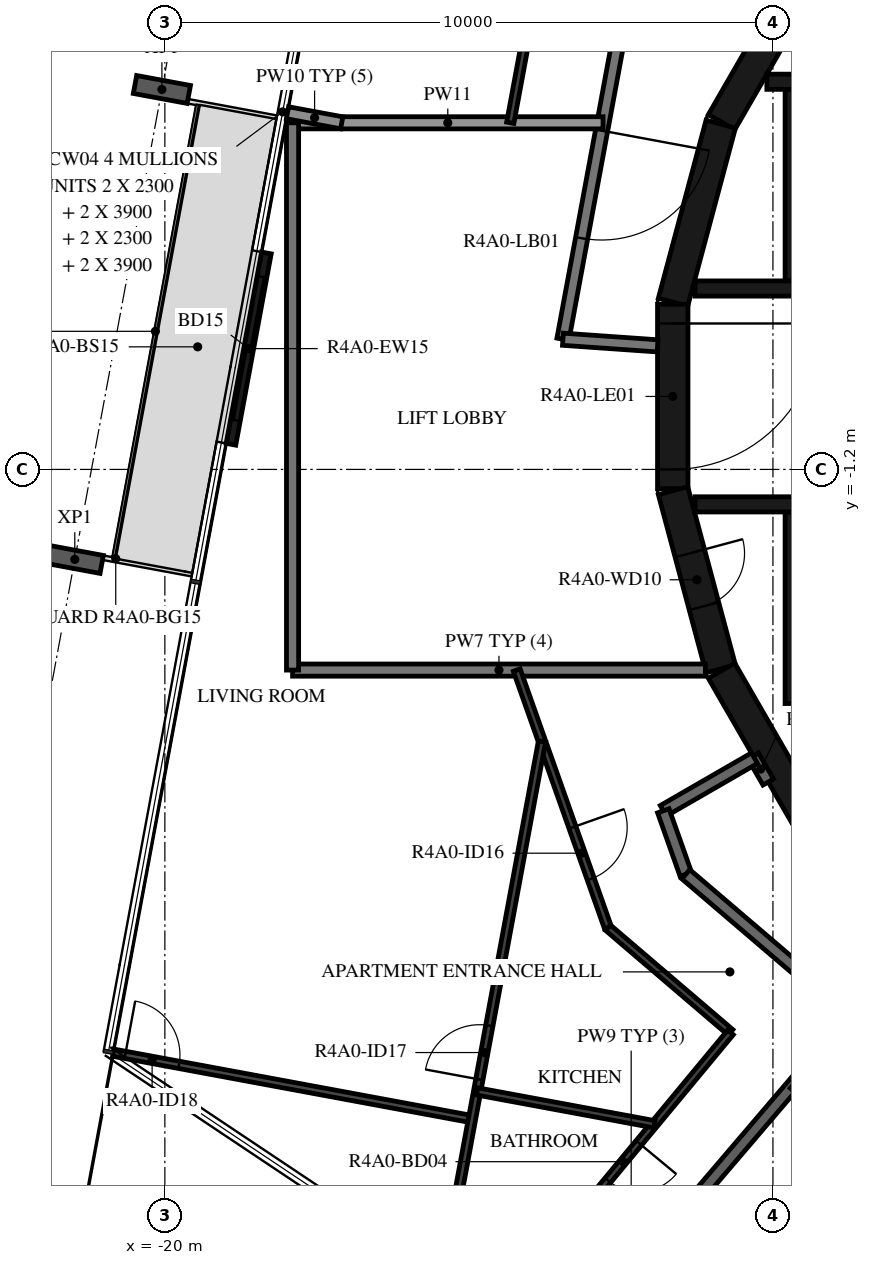
"""IFC4 building model, lengths in metres.
Left out: names, types, materials, properties, quantities, classifications, styles, units other than length and angle.
Written with IfcOpenShell. Run it as: python <this file> out.ifc"""

import sys

from ifc_helpers import new_model, si_unit, direction, frame, frame_2d, origin, origin_2d, place, context, subcontext, project, spatial, polyline, rectangle, i_section, outline, extrude, element, fill, save


model = new_model("IFC4")
c1 = context("Model", 3, precision=1e-05, world=origin(), true_north=direction((0.0, 1.0)))
c2 = subcontext(c1, "Body", "Model", "MODEL_VIEW")
j1 = project(units=[si_unit("LENGTHUNIT", "METRE"), si_unit("PLANEANGLEUNIT", "RADIAN")], contexts=[c1])
p1 = place(None, origin())
s1 = spatial("IfcSite", under=j1, at=p1, CompositionType="ELEMENT")
p2 = place(p1, origin())
s2 = spatial("IfcBuilding", under=s1, at=p2, CompositionType="ELEMENT")
p3 = place(p2, frame((0.0, 0.0, 158.7)))
s3 = spatial("IfcBuildingStorey", under=s2, at=p3, CompositionType="ELEMENT", Elevation=158.7)
for number, where, z_axis, x_axis in (
    (1, (-20.049, 5.048, -0.38), (0.0, 0.0, 1.0), (0.182, 0.983, 0.0)),
    (2, (-21.481, -2.68, -0.38), (0.0, 0.0, 1.0), (0.182, 0.983, 0.0)),
):
    element("IfcColumn", number, at=place(p3, frame(where, z_axis=z_axis, x_axis=x_axis)), inside=s3, PredefinedType="COLUMN", context=c2, shape_type="SweptSolid", body=[
        extrude(i_section(OverallWidth=0.3, OverallDepth=0.9, WebThickness=0.019, FlangeThickness=0.035, FilletRadius=0.03, at=origin_2d()), origin(), (0.0, 0.0, 1.0), 3.5),
    ])
p4 = place(p3, frame((-18.33, 2.36, 0.0), z_axis=(0.0, 0.0, 1.0), x_axis=(-0.18226136951, -0.983250117307, 0.0)))
e3 = element("IfcWall", 3, at=p4, inside=s3, PredefinedType="STANDARD", context=c2, shape_type="SweptSolid", body=[
    extrude(rectangle(XDim=3.2, YDim=0.16, at=frame_2d((1.6, 0.0))), origin(), (0.0, 0.0, 1.0), 3.12),
])
p5 = place(p4, frame((0.4, 0.0, 0.0)))
e4 = element("IfcOpeningElement", 4, at=p5, cuts=e3, PredefinedType="OPENING", context=c2, shape_type="SweptSolid", body=[
    extrude(rectangle(XDim=2.4, YDim=2.4, at=frame_2d((1.2, 1.2))), frame((0.0, 0.09, 0.0), z_axis=(0.0, -1.0, 0.0), x_axis=(1.0, 0.0, 0.0)), (0.0, 0.0, 1.0), 0.18),
])
for number, where, z_axis, x_axis in (
    (5, (-9.329, 7.137, 0.0), (0.0, 0.0, 1.0), (-0.5, -0.866, 0.0)),
    (6, (-10.858, 4.479, 0.0), (0.0, 0.0, 1.0), (-0.259, -0.966, 0.0)),
):
    element("IfcWall", number, at=place(p3, frame(where, z_axis=z_axis, x_axis=x_axis)), inside=s3, PredefinedType="SHEAR", context=c2, shape_type="SweptSolid", body=[
        extrude(rectangle(XDim=3.033, YDim=0.5, at=frame_2d((1.516, 0.0))), origin(), (0.0, 0.0, 1.0), 3.12),
    ])
p6 = place(p3, frame((-11.647, 1.516, 0.0), z_axis=(0.0, 0.0, 1.0), x_axis=(0.0, -1.0, 0.0)))
e7 = element("IfcWall", 7, at=p6, inside=s3, PredefinedType="SHEAR", context=c2, shape_type="SweptSolid", body=[
    extrude(rectangle(XDim=3.033, YDim=0.5, at=frame_2d((1.516, 0.0))), origin(), (0.0, 0.0, 1.0), 3.12),
])
p7 = place(p6, frame((0.316, 0.0, 0.0)))
e8 = element("IfcOpeningElement", 8, at=p7, cuts=e7, PredefinedType="OPENING", context=c2, shape_type="SweptSolid", body=[
    extrude(rectangle(XDim=2.4, YDim=2.1, at=frame_2d((1.2, 1.05))), frame((0.0, 0.26, 0.0), z_axis=(0.0, -1.0, 0.0), x_axis=(1.0, 0.0, 0.0)), (0.0, 0.0, 1.0), 0.52),
])
p8 = place(p3, frame((-11.643, -1.55, 0.0), z_axis=(0.0, 0.0, 1.0), x_axis=(0.258734743916, -0.965948410781, 0.0)))
e9 = element("IfcWall", 9, at=p8, inside=s3, PredefinedType="SHEAR", context=c2, shape_type="SweptSolid", body=[
    extrude(rectangle(XDim=3.033, YDim=0.5, at=frame_2d((1.516, 0.0))), origin(), (0.0, 0.0, 1.0), 3.12),
])
p9 = place(p8, frame((1.066, 0.0, 0.0)))
e10 = element("IfcOpeningElement", 10, at=p9, cuts=e9, PredefinedType="OPENING", context=c2, shape_type="SweptSolid", body=[
    extrude(rectangle(XDim=0.9, YDim=2.1, at=frame_2d((0.45, 1.05))), frame((0.0, 0.26, 0.0), z_axis=(0.0, -1.0, 0.0), x_axis=(1.0, 0.0, 0.0)), (0.0, 0.0, 1.0), 0.52),
])
p10 = place(p3, frame((-10.845, -4.51, 0.0), z_axis=(0.0, 0.0, 1.0), x_axis=(0.500087131594, -0.865975092491, 0.0)))
e11 = element("IfcWall", 11, at=p10, inside=s3, PredefinedType="SHEAR", context=c2, shape_type="SweptSolid", body=[
    extrude(rectangle(XDim=3.033, YDim=0.5, at=frame_2d((1.516, 0.0))), origin(), (0.0, 0.0, 1.0), 3.12),
])
p11 = place(p3, frame((-7.0, 5.175, 0.0), z_axis=(0.0, 0.0, 1.0), x_axis=(-1.0, 0.0, 0.0)))
e12 = element("IfcWall", 12, at=p11, inside=s3, PredefinedType="SHEAR", context=c2, shape_type="SweptSolid", body=[
    extrude(rectangle(XDim=3.1, YDim=0.25, at=frame_2d((1.55, 0.0))), origin(), (0.0, 0.0, 1.0), 3.12),
])
p12 = place(p3, origin())
e13 = element("IfcWall", 13, at=p12, inside=s3, PredefinedType="SHEAR", context=c2, shape_type="SweptSolid", body=[
    extrude(outline(polyline([(-9.55, 4.8), (-1.2, 4.8), (-1.2, 1.9), (-0.95, 1.9), (-0.95, 4.8), (0.95, 4.8), (0.95, 1.9), (1.2, 1.9), (1.2, 4.8), (3.1, 4.8), (3.1, 1.9), (3.35, 1.9), (3.35, 4.8), (5.25, 4.8), (5.25, 1.9), (5.5, 1.9), (5.5, 4.8), (7.4, 4.8), (7.4, 1.9), (7.65, 1.9), (7.65, 4.8), (9.55, 4.8), (9.55, 1.9), (9.8, 1.9), (9.8, 4.8), (9.8, 5.05), (-9.8, 5.05), (-9.8, 4.8), (-9.8, 1.9), (-9.55, 1.9), (-9.55, 4.8)])), origin(), (0.0, 0.0, 1.0), 3.12),
])
p13 = place(p3, origin())
e14 = element("IfcWall", 14, at=p13, inside=s3, PredefinedType="SHEAR", context=c2, shape_type="SweptSolid", body=[
    extrude(outline(polyline([(9.8, -5.05), (9.8, -4.8), (9.8, -1.9), (9.55, -1.9), (9.55, -4.8), (7.65, -4.8), (7.65, -1.9), (7.4, -1.9), (7.4, -4.8), (5.5, -4.8), (5.5, -1.9), (5.25, -1.9), (5.25, -4.8), (3.35, -4.8), (3.35, -1.9), (3.1, -1.9), (3.1, -4.8), (1.2, -4.8), (1.2, -1.9), (0.95, -1.9), (0.95, -4.8), (-0.95, -4.8), (-0.95, -1.9), (-1.2, -1.9), (-1.2, -4.8), (-3.1, -4.8), (-3.1, -1.9), (-3.35, -1.9), (-3.35, -4.8), (-5.25, -4.8), (-5.25, -1.9), (-5.5, -1.9), (-5.5, -4.8), (-7.4, -4.8), (-7.4, -1.9), (-7.65, -1.9), (-7.65, -4.8), (-9.55, -4.8), (-9.55, -1.9), (-9.8, -1.9), (-9.8, -4.8), (-9.8, -5.05), (9.8, -5.05)])), origin(), (0.0, 0.0, 1.0), 3.12),
])
p14 = place(p3, frame((-11.28, 1.775, 0.0), z_axis=(0.0, 0.0, 1.0), x_axis=(1.0, 0.0, 0.0)))
e15 = element("IfcWall", 15, at=p14, inside=s3, PredefinedType="SHEAR", context=c2, shape_type="SweptSolid", body=[
    extrude(rectangle(XDim=14.38, YDim=0.25, at=frame_2d((7.19, 0.0))), origin(), (0.0, 0.0, 1.0), 3.12),
])
p15 = place(p14, frame((10.73, 0.0, 0.0)))
e16 = element("IfcOpeningElement", 16, at=p15, cuts=e15, PredefinedType="OPENING", context=c2, shape_type="SweptSolid", body=[
    extrude(rectangle(XDim=1.1, YDim=2.1, at=frame_2d((0.55, 1.05))), frame((0.0, 0.135, 0.0), z_axis=(0.0, -1.0, 0.0), x_axis=(1.0, 0.0, 0.0)), (0.0, 0.0, 1.0), 0.27),
])
p16 = place(p14, frame((12.88, 0.0, 0.0)))
e17 = element("IfcOpeningElement", 17, at=p16, cuts=e15, PredefinedType="OPENING", context=c2, shape_type="SweptSolid", body=[
    extrude(rectangle(XDim=1.1, YDim=2.1, at=frame_2d((0.55, 1.05))), frame((0.0, 0.135, 0.0), z_axis=(0.0, -1.0, 0.0), x_axis=(1.0, 0.0, 0.0)), (0.0, 0.0, 1.0), 0.27),
])
p17 = place(p14, frame((5.455, 0.0, 0.0)))
e18 = element("IfcOpeningElement", 18, at=p17, cuts=e15, PredefinedType="OPENING", context=c2, shape_type="SweptSolid", body=[
    extrude(rectangle(XDim=0.9, YDim=2.1, at=frame_2d((0.45, 1.05))), frame((0.0, 0.135, 0.0), z_axis=(0.0, -1.0, 0.0), x_axis=(1.0, 0.0, 0.0)), (0.0, 0.0, 1.0), 0.27),
])
p18 = place(p3, frame((-11.28, -1.775, 0.0), z_axis=(0.0, 0.0, 1.0), x_axis=(1.0, 0.0, 0.0)))
e19 = element("IfcWall", 19, at=p18, inside=s3, PredefinedType="SHEAR", context=c2, shape_type="SweptSolid", body=[
    extrude(rectangle(XDim=14.38, YDim=0.25, at=frame_2d((7.19, 0.0))), origin(), (0.0, 0.0, 1.0), 3.12),
])
p19 = place(p18, frame((2.03, 0.0, 0.0)))
e20 = element("IfcOpeningElement", 20, at=p19, cuts=e19, PredefinedType="OPENING", context=c2, shape_type="SweptSolid", body=[
    extrude(rectangle(XDim=1.3, YDim=2.1, at=frame_2d((0.65, 1.05))), frame((0.0, 0.135, 0.0), z_axis=(0.0, -1.0, 0.0), x_axis=(1.0, 0.0, 0.0)), (0.0, 0.0, 1.0), 0.27),
])
p20 = place(p18, frame((4.18, 0.0, 0.0)))
e21 = element("IfcOpeningElement", 21, at=p20, cuts=e19, PredefinedType="OPENING", context=c2, shape_type="SweptSolid", body=[
    extrude(rectangle(XDim=1.3, YDim=2.1, at=frame_2d((0.65, 1.05))), frame((0.0, 0.135, 0.0), z_axis=(0.0, -1.0, 0.0), x_axis=(1.0, 0.0, 0.0)), (0.0, 0.0, 1.0), 0.27),
])
p21 = place(p18, frame((12.88, 0.0, 0.0)))
e22 = element("IfcOpeningElement", 22, at=p21, cuts=e19, PredefinedType="OPENING", context=c2, shape_type="SweptSolid", body=[
    extrude(rectangle(XDim=1.1, YDim=2.1, at=frame_2d((0.55, 1.05))), frame((0.0, 0.135, 0.0), z_axis=(0.0, -1.0, 0.0), x_axis=(1.0, 0.0, 0.0)), (0.0, 0.0, 1.0), 0.27),
])
p22 = place(p18, frame((6.53, 0.0, 0.0)))
e23 = element("IfcOpeningElement", 23, at=p22, cuts=e19, PredefinedType="OPENING", context=c2, shape_type="SweptSolid", body=[
    extrude(rectangle(XDim=0.9, YDim=2.1, at=frame_2d((0.45, 1.05))), frame((0.0, 0.135, 0.0), z_axis=(0.0, -1.0, 0.0), x_axis=(1.0, 0.0, 0.0)), (0.0, 0.0, 1.0), 0.27),
])
p23 = place(p18, frame((8.68, 0.0, 0.0)))
e24 = element("IfcOpeningElement", 24, at=p23, cuts=e19, PredefinedType="OPENING", context=c2, shape_type="SweptSolid", body=[
    extrude(rectangle(XDim=0.9, YDim=2.1, at=frame_2d((0.45, 1.05))), frame((0.0, 0.135, 0.0), z_axis=(0.0, -1.0, 0.0), x_axis=(1.0, 0.0, 0.0)), (0.0, 0.0, 1.0), 0.27),
])
p24 = place(p18, frame((10.83, 0.0, 0.0)))
e25 = element("IfcOpeningElement", 25, at=p24, cuts=e19, PredefinedType="OPENING", context=c2, shape_type="SweptSolid", body=[
    extrude(rectangle(XDim=0.9, YDim=2.1, at=frame_2d((0.45, 1.05))), frame((0.0, 0.135, 0.0), z_axis=(0.0, -1.0, 0.0), x_axis=(1.0, 0.0, 0.0)), (0.0, 0.0, 1.0), 0.27),
])
p25 = place(p3, frame((-12.521, 5.972, 0.0), z_axis=(0.0, 0.0, 1.0), x_axis=(-0.182251559718, -0.983251935661, 0.0)))
e26 = element("IfcWall", 26, at=p25, inside=s3, PredefinedType="STANDARD", context=c2, shape_type="SweptSolid", body=[
    extrude(rectangle(XDim=5.117, YDim=0.2, at=frame_2d((2.559, 0.0))), origin(), (0.0, 0.0, 1.0), 3.12),
])
p26 = place(p25, frame((1.627, 0.0, 0.0)))
e27 = element("IfcOpeningElement", 27, at=p26, cuts=e26, PredefinedType="OPENING", context=c2, shape_type="SweptSolid", body=[
    extrude(rectangle(XDim=1.8, YDim=2.1, at=frame_2d((0.9, 1.05))), frame((0.0, 0.11, 0.0), z_axis=(0.0, -1.0, 0.0), x_axis=(1.0, 0.0, 0.0)), (0.0, 0.0, 1.0), 0.22),
])
p27 = place(p3, frame((-13.454, 0.941, 0.0), z_axis=(0.0, 0.0, 1.0), x_axis=(0.99755155062, -0.069934997354, 0.0)))
e28 = element("IfcWall", 28, at=p27, inside=s3, PredefinedType="STANDARD", context=c2, shape_type="SweptSolid", body=[
    extrude(rectangle(XDim=1.561, YDim=0.2, at=frame_2d((0.78, 0.0))), origin(), (0.0, 0.0, 1.0), 3.12),
])
p28 = place(p3, frame((-10.323, -5.914, 0.0), z_axis=(0.0, 0.0, 1.0), x_axis=(0.500137201729, -0.865946175837, 0.0)))
e29 = element("IfcWall", 29, at=p28, inside=s3, PredefinedType="STANDARD", context=c2, shape_type="SweptSolid", body=[
    extrude(rectangle(XDim=0.492, YDim=0.2, at=frame_2d((0.246, 0.0))), origin(), (0.0, 0.0, 1.0), 3.12),
])
p29 = place(p3, frame((-10.303, -5.949, 0.0), z_axis=(0.0, 0.0, 1.0), x_axis=(-0.866021168401, -0.500007335828, 0.0)))
e30 = element("IfcWall", 30, at=p29, inside=s3, PredefinedType="STANDARD", context=c2, shape_type="SweptSolid", body=[
    extrude(rectangle(XDim=1.731, YDim=0.2, at=frame_2d((0.865, 0.0))), origin(), (0.0, 0.0, 1.0), 3.12),
])
p30 = place(p3, frame((-11.802, -6.814, 0.0), z_axis=(0.0, 0.0, 1.0), x_axis=(0.333904297771, -0.942606980629, 0.0)))
e31 = element("IfcWall", 31, at=p30, inside=s3, PredefinedType="STANDARD", context=c2, shape_type="SweptSolid", body=[
    extrude(rectangle(XDim=1.107, YDim=0.2, at=frame_2d((0.553, 0.0))), origin(), (0.0, 0.0, 1.0), 3.12),
])
p31 = place(p3, frame((-11.433, -7.858, 0.0), z_axis=(0.0, 0.0, 1.0), x_axis=(0.760412154545, -0.649440801937, 0.0)))
e32 = element("IfcWall", 32, at=p31, inside=s3, PredefinedType="STANDARD", context=c2, shape_type="SweptSolid", body=[
    extrude(rectangle(XDim=7.181, YDim=0.2, at=frame_2d((3.59, 0.0))), origin(), (0.0, 0.0, 1.0), 3.12),
])
p32 = place(p31, frame((2.39, 0.0, 0.0)))
e33 = element("IfcOpeningElement", 33, at=p32, cuts=e32, PredefinedType="OPENING", context=c2, shape_type="SweptSolid", body=[
    extrude(rectangle(XDim=1.0, YDim=2.1, at=frame_2d((0.5, 1.05))), frame((0.0, 0.11, 0.0), z_axis=(0.0, -1.0, 0.0), x_axis=(1.0, 0.0, 0.0)), (0.0, 0.0, 1.0), 0.22),
])
p33 = place(p3, frame((-12.794, 4.5, 0.0), z_axis=(0.0, 0.0, 1.0), x_axis=(-1.0, 0.0, 0.0)))
e34 = element("IfcWall", 34, at=p33, inside=s3, PredefinedType="STANDARD", context=c2, shape_type="SweptSolid", body=[
    extrude(rectangle(XDim=5.106, YDim=0.2, at=frame_2d((2.553, 0.0))), origin(), (0.0, 0.0, 1.0), 2.73),
])
p34 = place(p3, frame((-17.9, -4.5, 0.0), z_axis=(0.0, 0.0, 1.0), x_axis=(1.0, 0.0, 0.0)))
e35 = element("IfcWall", 35, at=p34, inside=s3, PredefinedType="STANDARD", context=c2, shape_type="SweptSolid", body=[
    extrude(rectangle(XDim=6.789, YDim=0.2, at=frame_2d((3.394, 0.0))), origin(), (0.0, 0.0, 1.0), 3.12),
])
p35 = place(p3, frame((-17.9, 4.5, 0.0), z_axis=(0.0, 0.0, 1.0), x_axis=(0.0, -1.0, 0.0)))
e36 = element("IfcWall", 36, at=p35, inside=s3, PredefinedType="STANDARD", context=c2, shape_type="SweptSolid", body=[
    extrude(rectangle(XDim=9.0, YDim=0.2, at=frame_2d((4.5, 0.0))), origin(), (0.0, 0.0, 1.0), 3.12),
])
p36 = place(p3, frame((-17.984, 4.665, 0.0), z_axis=(0.0, 0.0, 1.0), x_axis=(0.98328378843, -0.182079629313, 0.0)))
e37 = element("IfcWall", 37, at=p36, inside=s3, PredefinedType="STANDARD", context=c2, shape_type="SweptSolid", body=[
    extrude(rectangle(XDim=0.908, YDim=0.2, at=frame_2d((0.454, 0.0))), origin(), (0.0, 0.0, 1.0), 2.73),
])
p37 = place(p3, frame((-11.838, -13.86, 0.0), z_axis=(0.0, 0.0, 1.0), x_axis=(0.64944503311, 0.760408540831, 0.0)))
e38 = element("IfcWall", 38, at=p37, inside=s3, PredefinedType="STANDARD", context=c2, shape_type="SweptSolid", body=[
    extrude(rectangle(XDim=4.827, YDim=0.2, at=frame_2d((2.414, 0.0))), origin(), (0.0, 0.0, 1.0), 3.12),
])
p38 = place(p3, frame((-13.923, 6.641, 0.0), z_axis=(0.0, 0.0, 1.0), x_axis=(-0.182209715759, -0.983259690765, 0.0)))
e39 = element("IfcWall", 39, at=p38, inside=s3, PredefinedType="PARTITIONING", context=c2, shape_type="SweptSolid", body=[
    extrude(rectangle(XDim=2.177, YDim=0.12, at=frame_2d((1.089, 0.0))), origin(), (0.0, 0.0, 1.0), 3.12),
])
p39 = place(p3, frame((-14.213, -4.5, 0.0), z_axis=(0.0, 0.0, 1.0), x_axis=(0.333802904542, -0.942642891513, 0.0)))
e40 = element("IfcWall", 40, at=p39, inside=s3, PredefinedType="PARTITIONING", context=c2, shape_type="SweptSolid", body=[
    extrude(rectangle(XDim=4.495, YDim=0.12, at=frame_2d((2.248, 0.0))), origin(), (0.0, 0.0, 1.0), 3.12),
])
p40 = place(p39, frame((2.744, 0.0, 0.0)))
e41 = element("IfcOpeningElement", 41, at=p40, cuts=e40, PredefinedType="OPENING", context=c2, shape_type="SweptSolid", body=[
    extrude(rectangle(XDim=0.9, YDim=2.1, at=frame_2d((0.45, 1.05))), frame((0.0, 0.07, 0.0), z_axis=(0.0, -1.0, 0.0), x_axis=(1.0, 0.0, 0.0)), (0.0, 0.0, 1.0), 0.14),
])
p41 = place(p3, frame((-12.713, -8.737, 0.0), z_axis=(0.0, 0.0, 1.0), x_axis=(0.760400223405, -0.649454771517, 0.0)))
e42 = element("IfcWall", 42, at=p41, inside=s3, PredefinedType="PARTITIONING", context=c2, shape_type="SweptSolid", body=[
    extrude(rectangle(XDim=2.649, YDim=0.12, at=frame_2d((1.325, 0.0))), origin(), (0.0, 0.0, 1.0), 3.12),
])
p42 = place(p3, frame((-10.698, -10.458, 0.0), z_axis=(0.0, 0.0, 1.0), x_axis=(-0.63830561059, -0.769783052223, 0.0)))
e43 = element("IfcWall", 43, at=p42, inside=s3, PredefinedType="PARTITIONING", context=c2, shape_type="SweptSolid", body=[
    extrude(rectangle(XDim=5.131, YDim=0.12, at=frame_2d((2.565, 0.0))), origin(), (0.0, 0.0, 1.0), 3.12),
])
p43 = place(p42, frame((2.363, 0.0, 0.0)))
e44 = element("IfcOpeningElement", 44, at=p43, cuts=e43, PredefinedType="OPENING", context=c2, shape_type="SweptSolid", body=[
    extrude(rectangle(XDim=0.8, YDim=2.1, at=frame_2d((0.4, 1.05))), frame((0.0, 0.07, 0.0), z_axis=(0.0, -1.0, 0.0), x_axis=(1.0, 0.0, 0.0)), (0.0, 0.0, 1.0), 0.14),
])
p44 = place(p3, frame((-20.849, -10.792, 0.0), z_axis=(0.0, 0.0, 1.0), x_axis=(0.983251500113, -0.182253909494, 0.0)))
e45 = element("IfcWall", 45, at=p44, inside=s3, PredefinedType="PARTITIONING", context=c2, shape_type="SweptSolid", body=[
    extrude(rectangle(XDim=6.0, YDim=0.12, at=frame_2d((3.0, 0.0))), origin(), (0.0, 0.0, 1.0), 2.73),
])
p45 = place(p44, frame((0.2, 0.0, 0.0)))
e46 = element("IfcOpeningElement", 46, at=p45, cuts=e45, PredefinedType="OPENING", context=c2, shape_type="SweptSolid", body=[
    extrude(rectangle(XDim=0.9, YDim=2.1, at=frame_2d((0.45, 1.05))), frame((0.0, 0.07, 0.0), z_axis=(0.0, -1.0, 0.0), x_axis=(1.0, 0.0, 0.0)), (0.0, 0.0, 1.0), 0.14),
])
p46 = place(p3, frame((-15.554, -15.149, 0.0), z_axis=(0.0, 0.0, 1.0), x_axis=(0.182237116667, 0.983254612656, 0.0)))
e47 = element("IfcWall", 47, at=p46, inside=s3, PredefinedType="PARTITIONING", context=c2, shape_type="SweptSolid", body=[
    extrude(rectangle(XDim=9.638, YDim=0.12, at=frame_2d((4.819, 0.0))), origin(), (0.0, 0.0, 1.0), 3.12),
])
p47 = place(p46, frame((3.984, 0.0, 0.0)))
e48 = element("IfcOpeningElement", 48, at=p47, cuts=e47, PredefinedType="OPENING", context=c2, shape_type="SweptSolid", body=[
    extrude(rectangle(XDim=0.9, YDim=2.1, at=frame_2d((0.45, 1.05))), frame((0.0, 0.07, 0.0), z_axis=(0.0, -1.0, 0.0), x_axis=(1.0, 0.0, 0.0)), (0.0, 0.0, 1.0), 0.14),
])
p48 = place(p3, frame((-14.865, -11.428, 0.0), z_axis=(0.0, 0.0, 1.0), x_axis=(0.983255224962, -0.182233812955, 0.0)))
e49 = element("IfcWall", 49, at=p48, inside=s3, PredefinedType="PARTITIONING", context=c2, shape_type="SweptSolid", body=[
    extrude(rectangle(XDim=2.963, YDim=0.12, at=frame_2d((1.482, 0.0))), origin(), (0.0, 0.0, 1.0), 3.12),
])
p49 = place(p3, frame((-9.677, -11.33, 0.0), z_axis=(0.0, 0.0, 1.0), x_axis=(0.760372142735, -0.649487647729, 0.0)))
e50 = element("IfcWall", 50, at=p49, inside=s3, PredefinedType="PARTITIONING", context=c2, shape_type="SweptSolid", body=[
    extrude(rectangle(XDim=1.636, YDim=0.12, at=frame_2d((0.818, 0.0))), origin(), (0.0, 0.0, 1.0), 3.12),
])
p50 = place(p49, frame((0.2, 0.0, 0.0)))
e51 = element("IfcOpeningElement", 51, at=p50, cuts=e50, PredefinedType="OPENING", context=c2, shape_type="SweptSolid", body=[
    extrude(rectangle(XDim=0.9, YDim=2.1, at=frame_2d((0.45, 1.05))), frame((0.0, 0.07, 0.0), z_axis=(0.0, -1.0, 0.0), x_axis=(1.0, 0.0, 0.0)), (0.0, 0.0, 1.0), 0.14),
])
p51 = place(p5, origin())
e52 = element("IfcDoor", 52, at=p51, inside=s3, OperationType="DOUBLE_DOOR_SLIDING", PredefinedType="DOOR", context=c2, shape_type="SweptSolid", body=[
    extrude(rectangle(XDim=2.4, YDim=2.4, at=frame_2d((1.2, 1.2))), frame((0.0, 0.025, 0.0), z_axis=(0.0, -1.0, 0.0), x_axis=(1.0, 0.0, 0.0)), (0.0, 0.0, 1.0), 0.05),
])
fill(e4, e52)
p52 = place(p7, origin())
e53 = element("IfcDoor", 53, at=p52, inside=s3, OperationType="DOUBLE_DOOR_SINGLE_SWING", PredefinedType="DOOR", context=c2, shape_type="SweptSolid", body=[
    extrude(rectangle(XDim=2.4, YDim=2.1, at=frame_2d((1.2, 1.05))), frame((0.0, 0.025, 0.0), z_axis=(0.0, -1.0, 0.0), x_axis=(1.0, 0.0, 0.0)), (0.0, 0.0, 1.0), 0.05),
])
fill(e8, e53)
p53 = place(p9, origin())
e54 = element("IfcDoor", 54, at=p53, inside=s3, OperationType="SINGLE_SWING_RIGHT", PredefinedType="DOOR", context=c2, shape_type="SweptSolid", body=[
    extrude(rectangle(XDim=0.9, YDim=2.1, at=frame_2d((0.45, 1.05))), frame((0.0, 0.025, 0.0), z_axis=(0.0, -1.0, 0.0), x_axis=(1.0, 0.0, 0.0)), (0.0, 0.0, 1.0), 0.05),
])
fill(e10, e54)
p54 = place(p40, origin())
e55 = element("IfcDoor", 55, at=p54, inside=s3, OperationType="SINGLE_SWING_RIGHT", PredefinedType="DOOR", context=c2, shape_type="SweptSolid", body=[
    extrude(rectangle(XDim=0.9, YDim=2.1, at=frame_2d((0.45, 1.05))), frame((0.0, 0.025, 0.0), z_axis=(0.0, -1.0, 0.0), x_axis=(1.0, 0.0, 0.0)), (0.0, 0.0, 1.0), 0.05),
])
fill(e41, e55)
p55 = place(p43, origin())
e56 = element("IfcDoor", 56, at=p55, inside=s3, OperationType="SINGLE_SWING_RIGHT", PredefinedType="DOOR", context=c2, shape_type="SweptSolid", body=[
    extrude(rectangle(XDim=0.8, YDim=2.1, at=frame_2d((0.4, 1.05))), frame((0.0, 0.025, 0.0), z_axis=(0.0, -1.0, 0.0), x_axis=(1.0, 0.0, 0.0)), (0.0, 0.0, 1.0), 0.05),
])
fill(e44, e56)
p56 = place(p47, origin())
e57 = element("IfcDoor", 57, at=p56, inside=s3, OperationType="SINGLE_SWING_RIGHT", PredefinedType="DOOR", context=c2, shape_type="SweptSolid", body=[
    extrude(rectangle(XDim=0.9, YDim=2.1, at=frame_2d((0.45, 1.05))), frame((0.0, 0.025, 0.0), z_axis=(0.0, -1.0, 0.0), x_axis=(1.0, 0.0, 0.0)), (0.0, 0.0, 1.0), 0.05),
])
fill(e48, e57)
p57 = place(p45, origin())
e58 = element("IfcDoor", 58, at=p57, inside=s3, OperationType="SINGLE_SWING_RIGHT", PredefinedType="DOOR", context=c2, shape_type="SweptSolid", body=[
    extrude(rectangle(XDim=0.9, YDim=2.1, at=frame_2d((0.45, 1.05))), frame((0.0, 0.025, 0.0), z_axis=(0.0, -1.0, 0.0), x_axis=(1.0, 0.0, 0.0)), (0.0, 0.0, 1.0), 0.05),
])
fill(e46, e58)
p58 = place(p26, origin())
e59 = element("IfcDoor", 59, at=p58, inside=s3, OperationType="DOUBLE_DOOR_SINGLE_SWING", PredefinedType="DOOR", context=c2, shape_type="SweptSolid", body=[
    extrude(rectangle(XDim=1.8, YDim=2.1, at=frame_2d((0.9, 1.05))), frame((0.0, 0.025, 0.0), z_axis=(0.0, -1.0, 0.0), x_axis=(1.0, 0.0, 0.0)), (0.0, 0.0, 1.0), 0.05),
])
fill(e27, e59)
save(model, sys.argv[1])
